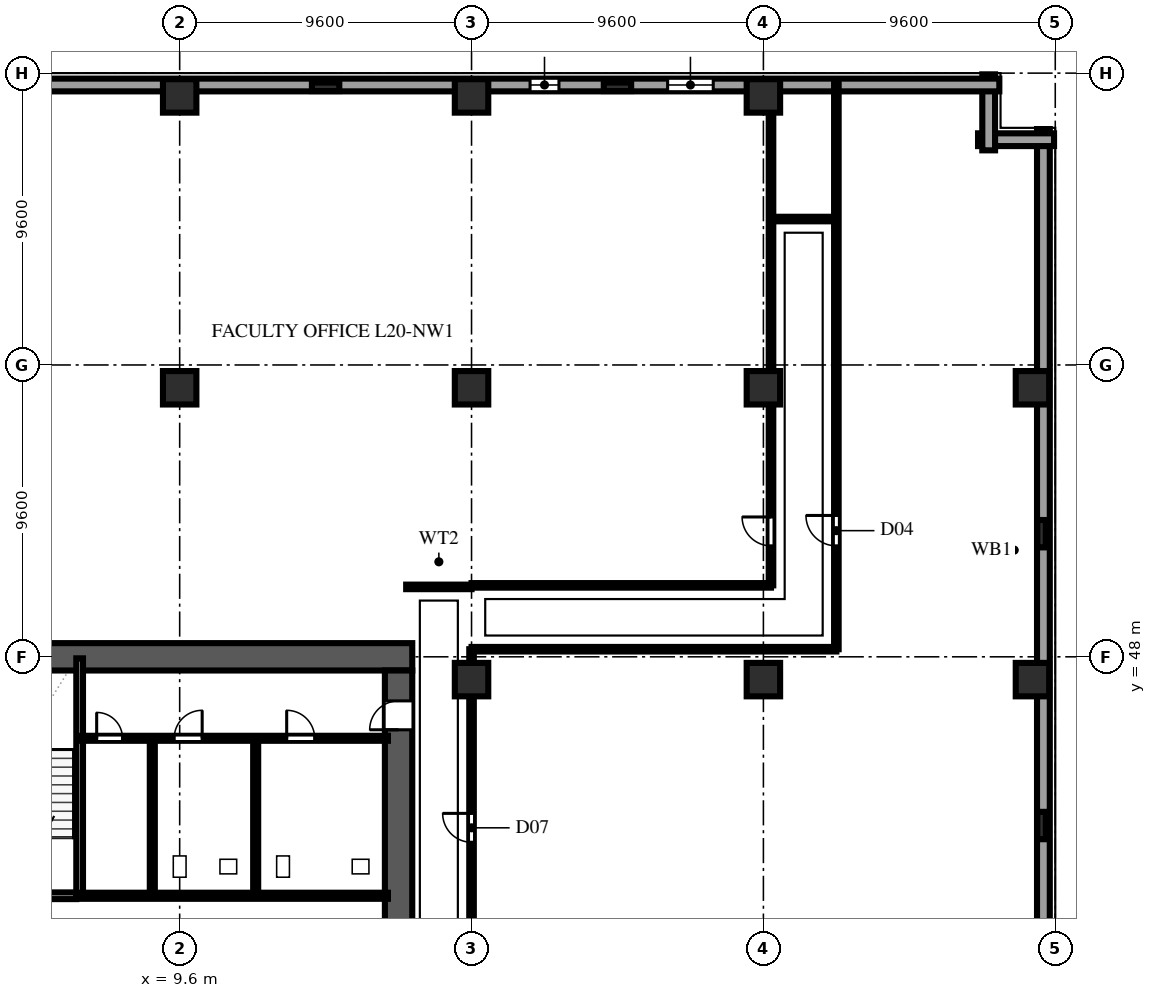
"""IFC4 building model, lengths in metres.
Left out: names, types, materials, properties, quantities, classifications, styles, units other than length and angle.
Written with IfcOpenShell. Run it as: python <this file> out.ifc"""

import sys

from ifc_helpers import new_model, si_unit, direction, frame, frame_2d, origin, origin_2d, place, context, subcontext, project, spatial, rectangle, extrude, element, fill, save


model = new_model("IFC4")
c1 = context("Model", 3, precision=1e-05, world=origin(), true_north=direction((0.0, 1.0)))
c2 = subcontext(c1, "Body", "Model", "MODEL_VIEW")
j1 = project(units=[si_unit("LENGTHUNIT", "METRE"), si_unit("PLANEANGLEUNIT", "RADIAN")], contexts=[c1])
p1 = place(None, origin())
s1 = spatial("IfcSite", under=j1, at=p1, CompositionType="ELEMENT")
p2 = place(p1, origin())
s2 = spatial("IfcBuilding", under=s1, at=p2, CompositionType="ELEMENT")
p3 = place(p2, frame((0.0, 0.0, 81.2)))
s3 = spatial("IfcBuildingStorey", under=s2, at=p3, CompositionType="ELEMENT", Elevation=81.2)
p4 = place(p3, frame((2.65, 48.0, 0.0), z_axis=(0.0, 0.0, 1.0), x_axis=(1.0, 0.0, 0.0)))
e1 = element("IfcWall", 1, at=p4, inside=s3, PredefinedType="SHEAR", context=c2, shape_type="SweptSolid", body=[
    extrude(rectangle(XDim=14.6, YDim=0.9, at=frame_2d((7.3, 0.0))), origin(), (0.0, 0.0, 1.0), 3.54),
])
p5 = place(p3, frame((16.8, 36.4, 0.0), z_axis=(0.0, 0.0, 1.0), x_axis=(0.0, 1.0, 0.0)))
e2 = element("IfcWall", 2, at=p5, inside=s3, PredefinedType="SHEAR", context=c2, shape_type="SweptSolid", body=[
    extrude(rectangle(XDim=11.15, YDim=0.9, at=frame_2d((5.575, 0.0))), origin(), (0.0, 0.0, 1.0), 3.54),
])
p6 = place(p5, frame((9.2, 0.0, 0.0)))
e3 = element("IfcOpeningElement", 3, at=p6, cuts=e2, PredefinedType="OPENING", context=c2, shape_type="SweptSolid", body=[
    extrude(rectangle(XDim=0.95, YDim=2.15, at=frame_2d((0.475, 1.075))), frame((0.0, 0.462, 0.0), z_axis=(0.0, -1.0, 0.0), x_axis=(1.0, 0.0, 0.0)), (0.0, 0.0, 1.0), 0.924),
])
for number, where, z_axis, x_axis in (
    (4, (9.6, 56.85, 0.0), (0.0, 0.0, 1.0), (1.0, 0.0, 0.0)),
    (5, (9.6, 66.45, 0.0), (0.0, 0.0, 1.0), (1.0, 0.0, 0.0)),
    (6, (19.2, 47.25, 0.0), (0.0, 0.0, 1.0), (1.0, 0.0, 0.0)),
    (7, (19.2, 56.85, 0.0), (0.0, 0.0, 1.0), (1.0, 0.0, 0.0)),
    (8, (19.2, 66.45, 0.0), (0.0, 0.0, 1.0), (1.0, 0.0, 0.0)),
    (9, (28.8, 47.25, 0.0), (0.0, 0.0, 1.0), (1.0, 0.0, 0.0)),
    (10, (28.8, 56.85, 0.0), (0.0, 0.0, 1.0), (1.0, 0.0, 0.0)),
    (11, (28.8, 66.45, 0.0), (0.0, 0.0, 1.0), (1.0, 0.0, 0.0)),
    (12, (37.65, 47.25, 0.0), (0.0, 0.0, 1.0), (1.0, 0.0, 0.0)),
    (13, (37.65, 56.85, 0.0), (0.0, 0.0, 1.0), (1.0, 0.0, 0.0)),
):
    element("IfcColumn", number, at=place(p3, frame(where, z_axis=z_axis, x_axis=x_axis)), inside=s3, PredefinedType="COLUMN", context=c2, shape_type="SweptSolid", body=[
        extrude(rectangle(XDim=1.1, YDim=1.1, at=origin_2d()), origin(), (0.0, 0.0, 1.0), 3.8),
    ])
for number, where, z_axis, x_axis in (
    (14, (14.4, 66.75, 0.0), (0.0, 0.0, 1.0), (1.0, 0.0, 0.0)),
    (15, (24.0, 66.75, 0.0), (0.0, 0.0, 1.0), (1.0, 0.0, 0.0)),
    (16, (37.95, 42.45, 0.0), (0.0, 0.0, 1.0), (0.0, 1.0, 0.0)),
    (17, (37.95, 52.05, 0.0), (0.0, 0.0, 1.0), (0.0, 1.0, 0.0)),
):
    element("IfcColumn", number, at=place(p3, frame(where, z_axis=z_axis, x_axis=x_axis)), inside=s3, PredefinedType="PILASTER", context=c2, shape_type="SweptSolid", body=[
        extrude(rectangle(XDim=0.9, YDim=0.28, at=origin_2d()), origin(), (0.0, 0.0, 1.0), 3.8),
    ])
p7 = place(p3, frame((38.01, 37.66, 0.0), z_axis=(0.0, 0.0, 1.0), x_axis=(0.0, 1.0, 0.0)))
e18 = element("IfcWall", 18, at=p7, inside=s3, PredefinedType="SOLIDWALL", context=c2, shape_type="SweptSolid", body=[
    extrude(rectangle(XDim=27.7, YDim=0.42, at=frame_2d((13.85, 0.0))), origin(), (0.0, 0.0, 1.0), 3.54),
])
for number, where, z_axis, x_axis in (
    (19, (38.36, 65.01, 0.0), (0.0, 0.0, 1.0), (-1.0, 0.0, 0.0)),
    (20, (36.21, 64.66, 0.0), (0.0, 0.0, 1.0), (0.0, 1.0, 0.0)),
):
    element("IfcWall", number, at=place(p3, frame(where, z_axis=z_axis, x_axis=x_axis)), inside=s3, PredefinedType="SOLIDWALL", context=c2, shape_type="SweptSolid", body=[
        extrude(rectangle(XDim=2.5, YDim=0.42, at=frame_2d((1.25, 0.0))), origin(), (0.0, 0.0, 1.0), 3.54),
    ])
p8 = place(p3, frame((36.56, 66.81, 0.0), z_axis=(0.0, 0.0, 1.0), x_axis=(-1.0, 0.0, 0.0)))
e21 = element("IfcWall", 21, at=p8, inside=s3, PredefinedType="SOLIDWALL", context=c2, shape_type="SweptSolid", body=[
    extrude(rectangle(XDim=34.72, YDim=0.42, at=frame_2d((17.36, 0.0))), origin(), (0.0, 0.0, 1.0), 3.54),
])
p9 = place(p8, frame((9.41, 0.0, 0.9)))
e22 = element("IfcOpeningElement", 22, at=p9, cuts=e21, PredefinedType="OPENING", context=c2, shape_type="SweptSolid", body=[
    extrude(rectangle(XDim=1.5, YDim=1.85, at=frame_2d((0.75, 0.925))), frame((0.0, 0.222, 0.0), z_axis=(0.0, -1.0, 0.0), x_axis=(1.0, 0.0, 0.0)), (0.0, 0.0, 1.0), 0.444),
])
p10 = place(p8, frame((14.485, 0.0, 0.9)))
e23 = element("IfcOpeningElement", 23, at=p10, cuts=e21, PredefinedType="OPENING", context=c2, shape_type="SweptSolid", body=[
    extrude(rectangle(XDim=0.95, YDim=1.85, at=frame_2d((0.475, 0.925))), frame((0.0, 0.222, 0.0), z_axis=(0.0, -1.0, 0.0), x_axis=(1.0, 0.0, 0.0)), (0.0, 0.0, 1.0), 0.444),
])
p11 = place(p3, frame((2.65, 40.14, 0.0), z_axis=(0.0, 0.0, 1.0), x_axis=(1.0, 0.0, 0.0)))
e24 = element("IfcWall", 24, at=p11, inside=s3, PredefinedType="SOLIDWALL", context=c2, shape_type="SweptSolid", body=[
    extrude(rectangle(XDim=3.55, YDim=0.22, at=frame_2d((1.775, 0.0))), origin(), (0.0, 0.0, 1.0), 3.54),
])
p12 = place(p11, frame((1.2, 0.0, 0.0)))
e25 = element("IfcOpeningElement", 25, at=p12, cuts=e24, PredefinedType="OPENING", context=c2, shape_type="SweptSolid", body=[
    extrude(rectangle(XDim=1.1, YDim=2.2, at=frame_2d((0.55, 1.1))), frame((0.0, 0.122, 0.0), z_axis=(0.0, -1.0, 0.0), x_axis=(1.0, 0.0, 0.0)), (0.0, 0.0, 1.0), 0.244),
])
p13 = place(p3, frame((6.31, 40.14, 0.0), z_axis=(0.0, 0.0, 1.0), x_axis=(0.0, 1.0, 0.0)))
e26 = element("IfcWall", 26, at=p13, inside=s3, PredefinedType="SOLIDWALL", context=c2, shape_type="SweptSolid", body=[
    extrude(rectangle(XDim=7.81, YDim=0.22, at=frame_2d((3.905, 0.0))), origin(), (0.0, 0.0, 1.0), 3.54),
])
p14 = place(p3, frame((6.32, 40.14, 0.0), z_axis=(0.0, 0.0, 1.0), x_axis=(1.0, 0.0, 0.0)))
e27 = element("IfcWall", 27, at=p14, inside=s3, PredefinedType="SOLIDWALL", context=c2, shape_type="SweptSolid", body=[
    extrude(rectangle(XDim=10.13, YDim=0.2, at=frame_2d((5.065, 0.0))), origin(), (0.0, 0.0, 1.0), 3.54),
])
p15 = place(p3, frame((6.32, 45.32, 0.0), z_axis=(0.0, 0.0, 1.0), x_axis=(1.0, 0.0, 0.0)))
e28 = element("IfcWall", 28, at=p15, inside=s3, PredefinedType="PLUMBINGWALL", context=c2, shape_type="SweptSolid", body=[
    extrude(rectangle(XDim=10.13, YDim=0.165, at=frame_2d((5.065, 0.0))), origin(), (0.0, 0.0, 1.0), 3.54),
])
p16 = place(p15, frame((0.55, 0.0, 0.0)))
e29 = element("IfcOpeningElement", 29, at=p16, cuts=e28, PredefinedType="OPENING", context=c2, shape_type="SweptSolid", body=[
    extrude(rectangle(XDim=0.85, YDim=2.1, at=frame_2d((0.425, 1.05))), frame((0.0, 0.094, 0.0), z_axis=(0.0, -1.0, 0.0), x_axis=(1.0, 0.0, 0.0)), (0.0, 0.0, 1.0), 0.189),
])
p17 = place(p15, frame((3.1, 0.0, 0.0)))
e30 = element("IfcOpeningElement", 30, at=p17, cuts=e28, PredefinedType="OPENING", context=c2, shape_type="SweptSolid", body=[
    extrude(rectangle(XDim=0.92, YDim=2.15, at=frame_2d((0.46, 1.075))), frame((0.0, 0.094, 0.0), z_axis=(0.0, -1.0, 0.0), x_axis=(1.0, 0.0, 0.0)), (0.0, 0.0, 1.0), 0.189),
])
p18 = place(p15, frame((6.8, 0.0, 0.0)))
e31 = element("IfcOpeningElement", 31, at=p18, cuts=e28, PredefinedType="OPENING", context=c2, shape_type="SweptSolid", body=[
    extrude(rectangle(XDim=0.92, YDim=2.15, at=frame_2d((0.46, 1.075))), frame((0.0, 0.094, 0.0), z_axis=(0.0, -1.0, 0.0), x_axis=(1.0, 0.0, 0.0)), (0.0, 0.0, 1.0), 0.189),
])
for number, where, z_axis, x_axis in (
    (32, (8.7, 40.4, 0.0), (0.0, 0.0, 1.0), (0.0, 1.0, 0.0)),
    (33, (12.1, 40.4, 0.0), (0.0, 0.0, 1.0), (0.0, 1.0, 0.0)),
):
    element("IfcWall", number, at=place(p3, frame(where, z_axis=z_axis, x_axis=x_axis)), inside=s3, PredefinedType="PLUMBINGWALL", context=c2, shape_type="SweptSolid", body=[
        extrude(rectangle(XDim=4.92, YDim=0.165, at=frame_2d((2.46, 0.0))), origin(), (0.0, 0.0, 1.0), 3.54),
    ])
p19 = place(p3, frame((17.05, 50.3, 0.0), z_axis=(0.0, 0.0, 1.0), x_axis=(1.0, 0.0, 0.0)))
e34 = element("IfcWall", 34, at=p19, inside=s3, PredefinedType="PARTITIONING", context=c2, shape_type="SweptSolid", body=[
    extrude(rectangle(XDim=2.15, YDim=0.15, at=frame_2d((1.075, 0.0))), origin(), (0.0, 0.0, 1.0), 3.54),
])
p20 = place(p3, frame((19.2, 25.05, 0.0), z_axis=(0.0, 0.0, 1.0), x_axis=(0.0, 1.0, 0.0)))
e35 = element("IfcWall", 35, at=p20, inside=s3, PredefinedType="PARTITIONING", context=c2, shape_type="SweptSolid", body=[
    extrude(rectangle(XDim=23.2, YDim=0.15, at=frame_2d((11.6, 0.0))), origin(), (0.0, 0.0, 1.0), 3.071),
])
p21 = place(p20, frame((16.85, 0.0, 0.0)))
e36 = element("IfcOpeningElement", 36, at=p21, cuts=e35, PredefinedType="OPENING", context=c2, shape_type="SweptSolid", body=[
    extrude(rectangle(XDim=0.95, YDim=2.15, at=frame_2d((0.475, 1.075))), frame((0.0, 0.087, 0.0), z_axis=(0.0, -1.0, 0.0), x_axis=(1.0, 0.0, 0.0)), (0.0, 0.0, 1.0), 0.174),
])
p22 = place(p3, frame((19.2, 48.25, 0.0), z_axis=(0.0, 0.0, 1.0), x_axis=(1.0, 0.0, 0.0)))
e37 = element("IfcWall", 37, at=p22, inside=s3, PredefinedType="PARTITIONING", context=c2, shape_type="SweptSolid", body=[
    extrude(rectangle(XDim=12.0, YDim=0.15, at=frame_2d((6.0, 0.0))), origin(), (0.0, 0.0, 1.0), 3.54),
])
p23 = place(p3, frame((19.2, 50.35, 0.0), z_axis=(0.0, 0.0, 1.0), x_axis=(1.0, 0.0, 0.0)))
e38 = element("IfcWall", 38, at=p23, inside=s3, PredefinedType="PARTITIONING", context=c2, shape_type="SweptSolid", body=[
    extrude(rectangle(XDim=9.85, YDim=0.15, at=frame_2d((4.925, 0.0))), origin(), (0.0, 0.0, 1.0), 3.54),
])
p24 = place(p3, frame((29.05, 62.4, 0.0), z_axis=(0.0, 0.0, 1.0), x_axis=(1.0, 0.0, 0.0)))
e39 = element("IfcWall", 39, at=p24, inside=s3, PredefinedType="PARTITIONING", context=c2, shape_type="SweptSolid", body=[
    extrude(rectangle(XDim=2.15, YDim=0.15, at=frame_2d((1.075, 0.0))), origin(), (0.0, 0.0, 1.0), 3.54),
])
p25 = place(p3, frame((31.2, 48.25, 0.0), z_axis=(0.0, 0.0, 1.0), x_axis=(0.0, 1.0, 0.0)))
e40 = element("IfcWall", 40, at=p25, inside=s3, PredefinedType="PARTITIONING", context=c2, shape_type="SweptSolid", body=[
    extrude(rectangle(XDim=18.73, YDim=0.15, at=frame_2d((9.365, 0.0))), origin(), (0.0, 0.0, 1.0), 3.54),
])
p26 = place(p25, frame((3.4, 0.0, 0.0)))
e41 = element("IfcOpeningElement", 41, at=p26, cuts=e40, PredefinedType="OPENING", context=c2, shape_type="SweptSolid", body=[
    extrude(rectangle(XDim=1.0, YDim=2.2, at=frame_2d((0.5, 1.1))), frame((0.0, 0.087, 0.0), z_axis=(0.0, -1.0, 0.0), x_axis=(1.0, 0.0, 0.0)), (0.0, 0.0, 1.0), 0.174),
])
p27 = place(p3, frame((29.05, 50.35, 0.0), z_axis=(0.0, 0.0, 1.0), x_axis=(0.0, 1.0, 0.0)))
e42 = element("IfcWall", 42, at=p27, inside=s3, PredefinedType="PARTITIONING", context=c2, shape_type="SweptSolid", body=[
    extrude(rectangle(XDim=16.63, YDim=0.15, at=frame_2d((8.315, 0.0))), origin(), (0.0, 0.0, 1.0), 3.54),
])
p28 = place(p27, frame((1.3, 0.0, 0.0)))
e43 = element("IfcOpeningElement", 43, at=p28, cuts=e42, PredefinedType="OPENING", context=c2, shape_type="SweptSolid", body=[
    extrude(rectangle(XDim=0.95, YDim=2.15, at=frame_2d((0.475, 1.075))), frame((0.0, 0.087, 0.0), z_axis=(0.0, -1.0, 0.0), x_axis=(1.0, 0.0, 0.0)), (0.0, 0.0, 1.0), 0.174),
])
p29 = place(p9, origin())
e44 = element("IfcWindow", 44, at=p29, inside=s3, PartitioningType="DOUBLE_PANEL_VERTICAL", PredefinedType="WINDOW", context=c2, shape_type="SweptSolid", body=[
    extrude(rectangle(XDim=1.5, YDim=1.85, at=frame_2d((0.75, 0.925))), frame((0.0, 0.11, 0.0), z_axis=(0.0, -1.0, 0.0), x_axis=(1.0, 0.0, 0.0)), (0.0, 0.0, 1.0), 0.06),
])
fill(e22, e44)
p30 = place(p10, origin())
e45 = element("IfcWindow", 45, at=p30, inside=s3, PartitioningType="SINGLE_PANEL", PredefinedType="WINDOW", context=c2, shape_type="SweptSolid", body=[
    extrude(rectangle(XDim=0.95, YDim=1.85, at=frame_2d((0.475, 0.925))), frame((0.0, 0.11, 0.0), z_axis=(0.0, -1.0, 0.0), x_axis=(1.0, 0.0, 0.0)), (0.0, 0.0, 1.0), 0.06),
])
fill(e23, e45)
p31 = place(p6, origin())
e46 = element("IfcDoor", 46, at=p31, inside=s3, OperationType="SINGLE_SWING_LEFT", PredefinedType="DOOR", context=c2, shape_type="SweptSolid", body=[
    extrude(rectangle(XDim=0.95, YDim=2.15, at=frame_2d((0.475, 1.075))), frame((0.0, 0.025, 0.0), z_axis=(0.0, -1.0, 0.0), x_axis=(1.0, 0.0, 0.0)), (0.0, 0.0, 1.0), 0.05),
])
fill(e3, e46)
p32 = place(p16, origin())
e47 = element("IfcDoor", 47, at=p32, inside=s3, OperationType="SINGLE_SWING_LEFT", PredefinedType="DOOR", context=c2, shape_type="SweptSolid", body=[
    extrude(rectangle(XDim=0.85, YDim=2.1, at=frame_2d((0.425, 1.05))), frame((0.0, 0.025, 0.0), z_axis=(0.0, -1.0, 0.0), x_axis=(1.0, 0.0, 0.0)), (0.0, 0.0, 1.0), 0.05),
])
fill(e29, e47)
p33 = place(p17, origin())
e48 = element("IfcDoor", 48, at=p33, inside=s3, OperationType="SINGLE_SWING_RIGHT", PredefinedType="DOOR", context=c2, shape_type="SweptSolid", body=[
    extrude(rectangle(XDim=0.92, YDim=2.15, at=frame_2d((0.46, 1.075))), frame((0.0, 0.025, 0.0), z_axis=(0.0, -1.0, 0.0), x_axis=(1.0, 0.0, 0.0)), (0.0, 0.0, 1.0), 0.05),
])
fill(e30, e48)
p34 = place(p18, origin())
e49 = element("IfcDoor", 49, at=p34, inside=s3, OperationType="SINGLE_SWING_LEFT", PredefinedType="DOOR", context=c2, shape_type="SweptSolid", body=[
    extrude(rectangle(XDim=0.92, YDim=2.15, at=frame_2d((0.46, 1.075))), frame((0.0, 0.025, 0.0), z_axis=(0.0, -1.0, 0.0), x_axis=(1.0, 0.0, 0.0)), (0.0, 0.0, 1.0), 0.05),
])
fill(e31, e49)
p35 = place(p21, origin())
e50 = element("IfcDoor", 50, at=p35, inside=s3, OperationType="SINGLE_SWING_RIGHT", PredefinedType="DOOR", context=c2, shape_type="SweptSolid", body=[
    extrude(rectangle(XDim=0.95, YDim=2.15, at=frame_2d((0.475, 1.075))), frame((0.0, 0.025, 0.0), z_axis=(0.0, -1.0, 0.0), x_axis=(1.0, 0.0, 0.0)), (0.0, 0.0, 1.0), 0.05),
])
fill(e36, e50)
p36 = place(p26, origin())
e51 = element("IfcDoor", 51, at=p36, inside=s3, OperationType="SINGLE_SWING_RIGHT", PredefinedType="DOOR", context=c2, shape_type="SweptSolid", body=[
    extrude(rectangle(XDim=1.0, YDim=2.2, at=frame_2d((0.5, 1.1))), frame((0.0, 0.025, 0.0), z_axis=(0.0, -1.0, 0.0), x_axis=(1.0, 0.0, 0.0)), (0.0, 0.0, 1.0), 0.05),
])
fill(e41, e51)
p37 = place(p28, origin())
e52 = element("IfcDoor", 52, at=p37, inside=s3, OperationType="SINGLE_SWING_RIGHT", PredefinedType="DOOR", context=c2, shape_type="SweptSolid", body=[
    extrude(rectangle(XDim=0.95, YDim=2.15, at=frame_2d((0.475, 1.075))), frame((0.0, 0.025, 0.0), z_axis=(0.0, -1.0, 0.0), x_axis=(1.0, 0.0, 0.0)), (0.0, 0.0, 1.0), 0.05),
])
fill(e43, e52)
save(model, sys.argv[1])
